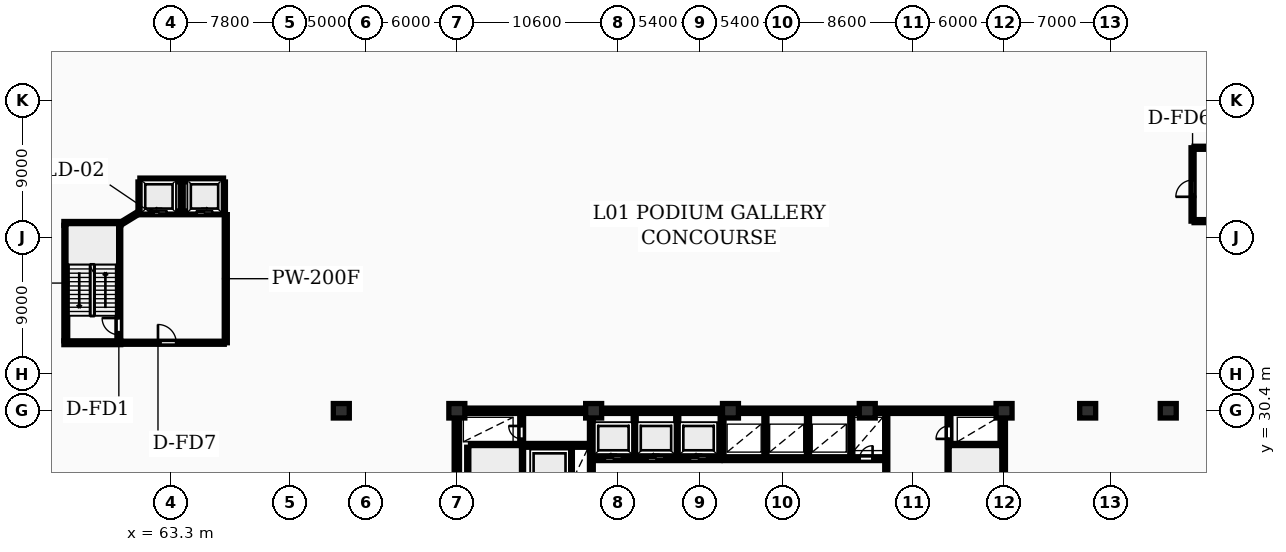
"""IFC4 building model, lengths in metres.
Left out: names, types, materials, properties, quantities, classifications, styles, units other than length and angle.
Written with IfcOpenShell. Run it as: python <this file> out.ifc"""

import sys

from ifc_helpers import new_model, si_unit, direction, frame, frame_2d, origin, origin_2d, place, context, subcontext, project, spatial, rectangle, extrude, element, fill, save


model = new_model("IFC4")
c1 = context("Model", 3, precision=1e-05, world=origin(), true_north=direction((0.0, 1.0)))
c2 = subcontext(c1, "Body", "Model", "MODEL_VIEW")
j1 = project(units=[si_unit("LENGTHUNIT", "METRE"), si_unit("PLANEANGLEUNIT", "RADIAN")], contexts=[c1])
p1 = place(None, origin())
s1 = spatial("IfcSite", under=j1, at=p1, CompositionType="ELEMENT")
p2 = place(p1, origin())
s2 = spatial("IfcBuilding", under=s1, at=p2, CompositionType="ELEMENT")
p3 = place(p2, frame((0.0, 0.0, 5.4)))
s3 = spatial("IfcBuildingStorey", under=s2, at=p3, CompositionType="ELEMENT", Elevation=5.4)
for number, where, z_axis, x_axis in (
    (1, (74.5, 30.4, 0.0), (0.0, 0.0, 1.0), (1.0, 0.0, 0.0)),
    (2, (82.1, 30.4, 0.0), (0.0, 0.0, 1.0), (1.0, 0.0, 0.0)),
    (3, (91.1, 30.4, 0.0), (0.0, 0.0, 1.0), (1.0, 0.0, 0.0)),
    (4, (100.1, 30.4, 0.0), (0.0, 0.0, 1.0), (1.0, 0.0, 0.0)),
    (5, (109.1, 30.4, 0.0), (0.0, 0.0, 1.0), (1.0, 0.0, 0.0)),
    (6, (118.1, 30.4, 0.0), (0.0, 0.0, 1.0), (1.0, 0.0, 0.0)),
    (7, (123.6, 30.4, 0.0), (0.0, 0.0, 1.0), (1.0, 0.0, 0.0)),
    (8, (128.9, 30.4, 0.0), (0.0, 0.0, 1.0), (1.0, 0.0, 0.0)),
):
    element("IfcColumn", number, at=place(p3, frame(where, z_axis=z_axis, x_axis=x_axis)), inside=s3, PredefinedType="COLUMN", context=c2, shape_type="SweptSolid", body=[
        extrude(rectangle(XDim=1.05, YDim=0.95, at=origin_2d()), origin(), (0.0, 0.0, 1.0), 4.6),
    ])
p4 = place(p3, frame((81.925, 30.4, 0.0), z_axis=(0.0, 0.0, 1.0), x_axis=(1.0, 0.0, 0.0)))
e9 = element("IfcWall", 9, at=p4, inside=s3, PredefinedType="SHEAR", context=c2, shape_type="SweptSolid", body=[
    extrude(rectangle(XDim=36.265, YDim=0.35, at=frame_2d((18.132, 0.0))), origin(), (0.0, 0.0, 1.0), 4.6),
])
for number, where, z_axis, x_axis in (
    (10, (82.1, 18.575, 0.0), (0.0, 0.0, 1.0), (0.0, 1.0, 0.0)),
    (11, (118.015, 18.575, 0.0), (0.0, 0.0, 1.0), (0.0, 1.0, 0.0)),
):
    element("IfcWall", number, at=place(p3, frame(where, z_axis=z_axis, x_axis=x_axis)), inside=s3, PredefinedType="SHEAR", context=c2, shape_type="SweptSolid", body=[
        extrude(rectangle(XDim=11.65, YDim=0.35, at=frame_2d((5.825, 0.0))), origin(), (0.0, 0.0, 1.0), 4.6),
    ])
p5 = place(p3, frame((82.875, 20.4, 0.0), z_axis=(0.0, 0.0, 1.0), x_axis=(0.0, 1.0, 0.0)))
e12 = element("IfcWall", 12, at=p5, inside=s3, PredefinedType="SHEAR", context=c2, shape_type="SweptSolid", body=[
    extrude(rectangle(XDim=7.6, YDim=0.25, at=frame_2d((3.8, 0.0))), origin(), (0.0, 0.0, 1.0), 4.6),
])
p6 = place(p3, frame((86.365, 18.6, 0.0), z_axis=(0.0, 0.0, 1.0), x_axis=(0.0, 1.0, 0.0)))
e13 = element("IfcWall", 13, at=p6, inside=s3, PredefinedType="SHEAR", context=c2, shape_type="SweptSolid", body=[
    extrude(rectangle(XDim=11.6, YDim=0.25, at=frame_2d((5.8, 0.0))), origin(), (0.0, 0.0, 1.0), 4.6),
])
p7 = place(p6, frame((0.45, 0.0, 0.0)))
e14 = element("IfcOpeningElement", 14, at=p7, cuts=e13, PredefinedType="OPENING", context=c2, shape_type="SweptSolid", body=[
    extrude(rectangle(XDim=0.85, YDim=2.05, at=frame_2d((0.425, 1.025))), frame((0.0, 0.135, 0.0), z_axis=(0.0, -1.0, 0.0), x_axis=(1.0, 0.0, 0.0)), (0.0, 0.0, 1.0), 0.27),
])
p8 = place(p6, frame((2.05, 0.0, 0.0)))
e15 = element("IfcOpeningElement", 15, at=p8, cuts=e13, PredefinedType="OPENING", context=c2, shape_type="SweptSolid", body=[
    extrude(rectangle(XDim=1.1, YDim=2.1, at=frame_2d((0.55, 1.05))), frame((0.0, 0.135, 0.0), z_axis=(0.0, -1.0, 0.0), x_axis=(1.0, 0.0, 0.0)), (0.0, 0.0, 1.0), 0.27),
])
p9 = place(p6, frame((9.95, 0.0, 0.0)))
e16 = element("IfcOpeningElement", 16, at=p9, cuts=e13, PredefinedType="OPENING", context=c2, shape_type="SweptSolid", body=[
    extrude(rectangle(XDim=0.85, YDim=2.05, at=frame_2d((0.425, 1.025))), frame((0.0, 0.135, 0.0), z_axis=(0.0, -1.0, 0.0), x_axis=(1.0, 0.0, 0.0)), (0.0, 0.0, 1.0), 0.27),
])
p10 = place(p3, frame((83.0, 28.125, 0.0), z_axis=(0.0, 0.0, 1.0), x_axis=(1.0, 0.0, 0.0)))
e17 = element("IfcWall", 17, at=p10, inside=s3, PredefinedType="SHEAR", context=c2, shape_type="SweptSolid", body=[
    extrude(rectangle(XDim=7.82, YDim=0.25, at=frame_2d((3.91, 0.0))), origin(), (0.0, 0.0, 1.0), 4.6),
])
p11 = place(p3, frame((89.6, 25.58, 0.0), z_axis=(0.0, 0.0, 1.0), x_axis=(0.0, 1.0, 0.0)))
e18 = element("IfcWall", 18, at=p11, inside=s3, PredefinedType="PARTITIONING", context=c2, shape_type="SweptSolid", body=[
    extrude(rectangle(XDim=2.42, YDim=0.2, at=frame_2d((1.21, 0.0))), origin(), (0.0, 0.0, 1.0), 4.3),
])
p12 = place(p3, frame((90.95, 18.6, 0.0), z_axis=(0.0, 0.0, 1.0), x_axis=(0.0, 1.0, 0.0)))
e19 = element("IfcWall", 19, at=p12, inside=s3, PredefinedType="SHEAR", context=c2, shape_type="SweptSolid", body=[
    extrude(rectangle(XDim=11.6, YDim=0.25, at=frame_2d((5.8, 0.0))), origin(), (0.0, 0.0, 1.0), 4.6),
])
p13 = place(p12, frame((4.6, 0.0, 0.0)))
e20 = element("IfcOpeningElement", 20, at=p13, cuts=e19, PredefinedType="OPENING", context=c2, shape_type="SweptSolid", body=[
    extrude(rectangle(XDim=1.1, YDim=2.1, at=frame_2d((0.55, 1.05))), frame((0.0, 0.135, 0.0), z_axis=(0.0, -1.0, 0.0), x_axis=(1.0, 0.0, 0.0)), (0.0, 0.0, 1.0), 0.27),
])
for number, where, z_axis, x_axis in (
    (21, (93.8, 27.38, 0.0), (0.0, 0.0, 1.0), (0.0, 1.0, 0.0)),
    (22, (96.6, 27.38, 0.0), (0.0, 0.0, 1.0), (0.0, 1.0, 0.0)),
):
    element("IfcWall", number, at=place(p3, frame(where, z_axis=z_axis, x_axis=x_axis)), inside=s3, PredefinedType="PARTITIONING", context=c2, shape_type="SweptSolid", body=[
        extrude(rectangle(XDim=2.82, YDim=0.2, at=frame_2d((1.41, 0.0))), origin(), (0.0, 0.0, 1.0), 4.3),
    ])
p14 = place(p3, frame((91.08, 27.25, 0.0), z_axis=(0.0, 0.0, 1.0), x_axis=(1.0, 0.0, 0.0)))
e23 = element("IfcWall", 23, at=p14, inside=s3, PredefinedType="SHEAR", context=c2, shape_type="SweptSolid", body=[
    extrude(rectangle(XDim=8.34, YDim=0.25, at=frame_2d((4.17, 0.0))), origin(), (0.0, 0.0, 1.0), 4.6),
])
p15 = place(p14, frame((0.76, 0.0, 0.0)))
e24 = element("IfcOpeningElement", 24, at=p15, cuts=e23, PredefinedType="OPENING", context=c2, shape_type="SweptSolid", body=[
    extrude(rectangle(XDim=1.12, YDim=2.12, at=frame_2d((0.56, 1.06))), frame((0.0, 0.135, 0.0), z_axis=(0.0, -1.0, 0.0), x_axis=(1.0, 0.0, 0.0)), (0.0, 0.0, 1.0), 0.27),
])
p16 = place(p14, frame((3.56, 0.0, 0.0)))
e25 = element("IfcOpeningElement", 25, at=p16, cuts=e23, PredefinedType="OPENING", context=c2, shape_type="SweptSolid", body=[
    extrude(rectangle(XDim=1.12, YDim=2.12, at=frame_2d((0.56, 1.06))), frame((0.0, 0.135, 0.0), z_axis=(0.0, -1.0, 0.0), x_axis=(1.0, 0.0, 0.0)), (0.0, 0.0, 1.0), 0.27),
])
p17 = place(p14, frame((6.36, 0.0, 0.0)))
e26 = element("IfcOpeningElement", 26, at=p17, cuts=e23, PredefinedType="OPENING", context=c2, shape_type="SweptSolid", body=[
    extrude(rectangle(XDim=1.12, YDim=2.12, at=frame_2d((0.56, 1.06))), frame((0.0, 0.135, 0.0), z_axis=(0.0, -1.0, 0.0), x_axis=(1.0, 0.0, 0.0)), (0.0, 0.0, 1.0), 0.27),
])
p18 = place(p3, frame((99.55, 27.25, 0.0), z_axis=(0.0, 0.0, 1.0), x_axis=(0.0, 1.0, 0.0)))
e27 = element("IfcWall", 27, at=p18, inside=s3, PredefinedType="SHEAR", context=c2, shape_type="SweptSolid", body=[
    extrude(rectangle(XDim=2.95, YDim=0.25, at=frame_2d((1.475, 0.0))), origin(), (0.0, 0.0, 1.0), 4.6),
])
for number, where, z_axis, x_axis in (
    (28, (102.4, 27.38, 0.0), (0.0, 0.0, 1.0), (0.0, 1.0, 0.0)),
    (29, (105.2, 27.38, 0.0), (0.0, 0.0, 1.0), (0.0, 1.0, 0.0)),
    (30, (108.05, 27.38, 0.0), (0.0, 0.0, 1.0), (0.0, 1.0, 0.0)),
):
    element("IfcWall", number, at=place(p3, frame(where, z_axis=z_axis, x_axis=x_axis)), inside=s3, PredefinedType="PARTITIONING", context=c2, shape_type="SweptSolid", body=[
        extrude(rectangle(XDim=2.82, YDim=0.2, at=frame_2d((1.41, 0.0))), origin(), (0.0, 0.0, 1.0), 4.3),
    ])
p19 = place(p3, frame((99.68, 27.25, 0.0), z_axis=(0.0, 0.0, 1.0), x_axis=(1.0, 0.0, 0.0)))
e31 = element("IfcWall", 31, at=p19, inside=s3, PredefinedType="SHEAR", context=c2, shape_type="SweptSolid", body=[
    extrude(rectangle(XDim=10.54, YDim=0.25, at=frame_2d((5.27, 0.0))), origin(), (0.0, 0.0, 1.0), 4.6),
])
p20 = place(p19, frame((8.92, 0.0, 0.0)))
e32 = element("IfcOpeningElement", 32, at=p20, cuts=e31, PredefinedType="OPENING", context=c2, shape_type="SweptSolid", body=[
    extrude(rectangle(XDim=0.85, YDim=2.05, at=frame_2d((0.425, 1.025))), frame((0.0, 0.135, 0.0), z_axis=(0.0, -1.0, 0.0), x_axis=(1.0, 0.0, 0.0)), (0.0, 0.0, 1.0), 0.27),
])
p21 = place(p3, frame((110.35, 18.6, 0.0), z_axis=(0.0, 0.0, 1.0), x_axis=(0.0, 1.0, 0.0)))
e33 = element("IfcWall", 33, at=p21, inside=s3, PredefinedType="PARTITIONING", context=c2, shape_type="SweptSolid", body=[
    extrude(rectangle(XDim=11.6, YDim=0.2, at=frame_2d((5.8, 0.0))), origin(), (0.0, 0.0, 1.0), 4.3),
])
p22 = place(p21, frame((5.2, 0.0, 0.0)))
e34 = element("IfcOpeningElement", 34, at=p22, cuts=e33, PredefinedType="OPENING", context=c2, shape_type="SweptSolid", body=[
    extrude(rectangle(XDim=1.1, YDim=2.15, at=frame_2d((0.55, 1.075))), frame((0.0, 0.11, 0.0), z_axis=(0.0, -1.0, 0.0), x_axis=(1.0, 0.0, 0.0)), (0.0, 0.0, 1.0), 0.22),
])
p23 = place(p3, frame((114.475, 18.6, 0.0), z_axis=(0.0, 0.0, 1.0), x_axis=(0.0, 1.0, 0.0)))
e35 = element("IfcWall", 35, at=p23, inside=s3, PredefinedType="SHEAR", context=c2, shape_type="SweptSolid", body=[
    extrude(rectangle(XDim=11.6, YDim=0.25, at=frame_2d((5.8, 0.0))), origin(), (0.0, 0.0, 1.0), 4.6),
])
p24 = place(p23, frame((0.45, 0.0, 0.0)))
e36 = element("IfcOpeningElement", 36, at=p24, cuts=e35, PredefinedType="OPENING", context=c2, shape_type="SweptSolid", body=[
    extrude(rectangle(XDim=0.85, YDim=2.05, at=frame_2d((0.425, 1.025))), frame((0.0, 0.135, 0.0), z_axis=(0.0, -1.0, 0.0), x_axis=(1.0, 0.0, 0.0)), (0.0, 0.0, 1.0), 0.27),
])
p25 = place(p23, frame((2.05, 0.0, 0.0)))
e37 = element("IfcOpeningElement", 37, at=p25, cuts=e35, PredefinedType="OPENING", context=c2, shape_type="SweptSolid", body=[
    extrude(rectangle(XDim=1.1, YDim=2.1, at=frame_2d((0.55, 1.05))), frame((0.0, 0.135, 0.0), z_axis=(0.0, -1.0, 0.0), x_axis=(1.0, 0.0, 0.0)), (0.0, 0.0, 1.0), 0.27),
])
p26 = place(p23, frame((9.95, 0.0, 0.0)))
e38 = element("IfcOpeningElement", 38, at=p26, cuts=e35, PredefinedType="OPENING", context=c2, shape_type="SweptSolid", body=[
    extrude(rectangle(XDim=0.85, YDim=2.05, at=frame_2d((0.425, 1.025))), frame((0.0, 0.135, 0.0), z_axis=(0.0, -1.0, 0.0), x_axis=(1.0, 0.0, 0.0)), (0.0, 0.0, 1.0), 0.27),
])
p27 = place(p3, frame((114.6, 28.125, 0.0), z_axis=(0.0, 0.0, 1.0), x_axis=(1.0, 0.0, 0.0)))
e39 = element("IfcWall", 39, at=p27, inside=s3, PredefinedType="SHEAR", context=c2, shape_type="SweptSolid", body=[
    extrude(rectangle(XDim=3.24, YDim=0.25, at=frame_2d((1.62, 0.0))), origin(), (0.0, 0.0, 1.0), 4.6),
])
p28 = place(p3, frame((56.375, 35.0, 0.0), z_axis=(0.0, 0.0, 1.0), x_axis=(0.0, 1.0, 0.0)))
e40 = element("IfcWall", 40, at=p28, inside=s3, PredefinedType="SHEAR", context=c2, shape_type="SweptSolid", body=[
    extrude(rectangle(XDim=7.6, YDim=0.25, at=frame_2d((3.8, 0.0))), origin(), (0.0, 0.0, 1.0), 4.6),
])
for number, where, z_axis, x_axis in (
    (41, (56.25, 42.725, 0.0), (0.0, 0.0, 1.0), (1.0, 0.0, 0.0)),
    (42, (56.25, 34.875, 0.0), (0.0, 0.0, 1.0), (1.0, 0.0, 0.0)),
):
    element("IfcWall", number, at=place(p3, frame(where, z_axis=z_axis, x_axis=x_axis)), inside=s3, PredefinedType="SHEAR", context=c2, shape_type="SweptSolid", body=[
        extrude(rectangle(XDim=3.74, YDim=0.25, at=frame_2d((1.87, 0.0))), origin(), (0.0, 0.0, 1.0), 4.6),
    ])
p29 = place(p3, frame((59.865, 35.0, 0.0), z_axis=(0.0, 0.0, 1.0), x_axis=(0.0, 1.0, 0.0)))
e43 = element("IfcWall", 43, at=p29, inside=s3, PredefinedType="SHEAR", context=c2, shape_type="SweptSolid", body=[
    extrude(rectangle(XDim=7.6, YDim=0.25, at=frame_2d((3.8, 0.0))), origin(), (0.0, 0.0, 1.0), 4.6),
])
p30 = place(p29, frame((0.4, 0.0, 0.0)))
e44 = element("IfcOpeningElement", 44, at=p30, cuts=e43, PredefinedType="OPENING", context=c2, shape_type="SweptSolid", body=[
    extrude(rectangle(XDim=1.1, YDim=2.1, at=frame_2d((0.55, 1.05))), frame((0.0, 0.135, 0.0), z_axis=(0.0, -1.0, 0.0), x_axis=(1.0, 0.0, 0.0)), (0.0, 0.0, 1.0), 0.27),
])
p31 = place(p3, frame((61.25, 43.42, 0.0), z_axis=(0.0, 0.0, 1.0), x_axis=(1.0, 0.0, 0.0)))
e45 = element("IfcWall", 45, at=p31, inside=s3, PredefinedType="SHEAR", context=c2, shape_type="SweptSolid", body=[
    extrude(rectangle(XDim=5.5, YDim=0.25, at=frame_2d((2.75, 0.0))), origin(), (0.0, 0.0, 1.0), 4.6),
])
p32 = place(p31, frame((0.74, 0.0, 0.0)))
e46 = element("IfcOpeningElement", 46, at=p32, cuts=e45, PredefinedType="OPENING", context=c2, shape_type="SweptSolid", body=[
    extrude(rectangle(XDim=1.02, YDim=2.12, at=frame_2d((0.51, 1.06))), frame((0.0, 0.135, 0.0), z_axis=(0.0, -1.0, 0.0), x_axis=(1.0, 0.0, 0.0)), (0.0, 0.0, 1.0), 0.27),
])
p33 = place(p31, frame((3.74, 0.0, 0.0)))
e47 = element("IfcOpeningElement", 47, at=p33, cuts=e45, PredefinedType="OPENING", context=c2, shape_type="SweptSolid", body=[
    extrude(rectangle(XDim=1.02, YDim=2.12, at=frame_2d((0.51, 1.06))), frame((0.0, 0.135, 0.0), z_axis=(0.0, -1.0, 0.0), x_axis=(1.0, 0.0, 0.0)), (0.0, 0.0, 1.0), 0.27),
])
p34 = place(p3, frame((61.25, 45.58, 0.0), z_axis=(0.0, 0.0, 1.0), x_axis=(1.0, 0.0, 0.0)))
e48 = element("IfcWall", 48, at=p34, inside=s3, PredefinedType="SHEAR", context=c2, shape_type="SweptSolid", body=[
    extrude(rectangle(XDim=5.5, YDim=0.25, at=frame_2d((2.75, 0.0))), origin(), (0.0, 0.0, 1.0), 4.6),
])
for number, where, z_axis, x_axis in (
    (49, (61.25, 43.55, 0.0), (0.0, 0.0, 1.0), (0.0, 1.0, 0.0)),
    (50, (66.75, 43.55, 0.0), (0.0, 0.0, 1.0), (0.0, 1.0, 0.0)),
):
    element("IfcWall", number, at=place(p3, frame(where, z_axis=z_axis, x_axis=x_axis)), inside=s3, PredefinedType="SHEAR", context=c2, shape_type="SweptSolid", body=[
        extrude(rectangle(XDim=1.9, YDim=0.25, at=frame_2d((0.95, 0.0))), origin(), (0.0, 0.0, 1.0), 4.6),
    ])
p35 = place(p3, frame((64.0, 43.55, 0.0), z_axis=(0.0, 0.0, 1.0), x_axis=(0.0, 1.0, 0.0)))
e51 = element("IfcWall", 51, at=p35, inside=s3, PredefinedType="PARTITIONING", context=c2, shape_type="SweptSolid", body=[
    extrude(rectangle(XDim=1.9, YDim=0.2, at=frame_2d((0.95, 0.0))), origin(), (0.0, 0.0, 1.0), 4.3),
])
p36 = place(p3, frame((59.84, 34.875, 0.0), z_axis=(0.0, 0.0, 1.0), x_axis=(1.0, 0.0, 0.0)))
e52 = element("IfcWall", 52, at=p36, inside=s3, PredefinedType="PARTITIONING", context=c2, shape_type="SweptSolid", body=[
    extrude(rectangle(XDim=6.96, YDim=0.2, at=frame_2d((3.48, 0.0))), origin(), (0.0, 0.0, 1.0), 4.3),
])
p37 = place(p36, frame((2.6, 0.0, 0.0)))
e53 = element("IfcOpeningElement", 53, at=p37, cuts=e52, PredefinedType="OPENING", context=c2, shape_type="SweptSolid", body=[
    extrude(rectangle(XDim=1.2, YDim=2.18, at=frame_2d((0.6, 1.09))), frame((0.0, 0.11, 0.0), z_axis=(0.0, -1.0, 0.0), x_axis=(1.0, 0.0, 0.0)), (0.0, 0.0, 1.0), 0.22),
])
p38 = place(p3, frame((66.9, 34.875, 0.0), z_axis=(0.0, 0.0, 1.0), x_axis=(0.0, 1.0, 0.0)))
e54 = element("IfcWall", 54, at=p38, inside=s3, PredefinedType="PARTITIONING", context=c2, shape_type="SweptSolid", body=[
    extrude(rectangle(XDim=8.425, YDim=0.2, at=frame_2d((4.212, 0.0))), origin(), (0.0, 0.0, 1.0), 4.3),
])
p39 = place(p3, frame((60.02, 42.725, 0.0), z_axis=(0.0, 0.0, 1.0), x_axis=(0.851822584555, 0.523830396638, 0.0)))
e55 = element("IfcWall", 55, at=p39, inside=s3, PredefinedType="PARTITIONING", context=c2, shape_type="SweptSolid", body=[
    extrude(rectangle(XDim=1.326, YDim=0.2, at=frame_2d((0.663, 0.0))), origin(), (0.0, 0.0, 1.0), 4.3),
])
p40 = place(p3, frame((130.5, 42.875, 0.0), z_axis=(0.0, 0.0, 1.0), x_axis=(0.0, 1.0, 0.0)))
e56 = element("IfcWall", 56, at=p40, inside=s3, PredefinedType="PARTITIONING", context=c2, shape_type="SweptSolid", body=[
    extrude(rectangle(XDim=4.825, YDim=0.2, at=frame_2d((2.413, 0.0))), origin(), (0.0, 0.0, 1.0), 4.3),
])
p41 = place(p40, frame((1.6, 0.0, 0.0)))
e57 = element("IfcOpeningElement", 57, at=p41, cuts=e56, PredefinedType="OPENING", context=c2, shape_type="SweptSolid", body=[
    extrude(rectangle(XDim=1.1, YDim=2.15, at=frame_2d((0.55, 1.075))), frame((0.0, 0.11, 0.0), z_axis=(0.0, -1.0, 0.0), x_axis=(1.0, 0.0, 0.0)), (0.0, 0.0, 1.0), 0.22),
])
for number, where, z_axis, x_axis in (
    (58, (130.6, 42.875, 0.0), (0.0, 0.0, 1.0), (1.0, 0.0, 0.0)),
    (59, (130.6, 47.7, 0.0), (0.0, 0.0, 1.0), (1.0, 0.0, 0.0)),
):
    element("IfcWall", number, at=place(p3, frame(where, z_axis=z_axis, x_axis=x_axis)), inside=s3, PredefinedType="PARTITIONING", context=c2, shape_type="SweptSolid", body=[
        extrude(rectangle(XDim=3.65, YDim=0.2, at=frame_2d((1.825, 0.0))), origin(), (0.0, 0.0, 1.0), 4.3),
    ])
p42 = place(p9, origin())
e60 = element("IfcDoor", 60, at=p42, inside=s3, OperationType="SINGLE_SWING_RIGHT", PredefinedType="DOOR", context=c2, shape_type="SweptSolid", body=[
    extrude(rectangle(XDim=0.85, YDim=2.05, at=frame_2d((0.425, 1.025))), frame((0.0, 0.025, 0.0), z_axis=(0.0, -1.0, 0.0), x_axis=(1.0, 0.0, 0.0)), (0.0, 0.0, 1.0), 0.05),
])
fill(e16, e60)
p43 = place(p15, origin())
e61 = element("IfcDoor", 61, at=p43, inside=s3, OperationType="SLIDING_TO_LEFT", PredefinedType="DOOR", context=c2, shape_type="SweptSolid", body=[
    extrude(rectangle(XDim=1.12, YDim=2.12, at=frame_2d((0.56, 1.06))), frame((0.0, 0.025, 0.0), z_axis=(0.0, -1.0, 0.0), x_axis=(1.0, 0.0, 0.0)), (0.0, 0.0, 1.0), 0.05),
])
fill(e24, e61)
p44 = place(p16, origin())
e62 = element("IfcDoor", 62, at=p44, inside=s3, OperationType="SLIDING_TO_LEFT", PredefinedType="DOOR", context=c2, shape_type="SweptSolid", body=[
    extrude(rectangle(XDim=1.12, YDim=2.12, at=frame_2d((0.56, 1.06))), frame((0.0, 0.025, 0.0), z_axis=(0.0, -1.0, 0.0), x_axis=(1.0, 0.0, 0.0)), (0.0, 0.0, 1.0), 0.05),
])
fill(e25, e62)
p45 = place(p17, origin())
e63 = element("IfcDoor", 63, at=p45, inside=s3, OperationType="SLIDING_TO_LEFT", PredefinedType="DOOR", context=c2, shape_type="SweptSolid", body=[
    extrude(rectangle(XDim=1.12, YDim=2.12, at=frame_2d((0.56, 1.06))), frame((0.0, 0.025, 0.0), z_axis=(0.0, -1.0, 0.0), x_axis=(1.0, 0.0, 0.0)), (0.0, 0.0, 1.0), 0.05),
])
fill(e26, e63)
p46 = place(p20, origin())
e64 = element("IfcDoor", 64, at=p46, inside=s3, OperationType="SINGLE_SWING_RIGHT", PredefinedType="DOOR", context=c2, shape_type="SweptSolid", body=[
    extrude(rectangle(XDim=0.85, YDim=2.05, at=frame_2d((0.425, 1.025))), frame((0.0, 0.025, 0.0), z_axis=(0.0, -1.0, 0.0), x_axis=(1.0, 0.0, 0.0)), (0.0, 0.0, 1.0), 0.05),
])
fill(e32, e64)
p47 = place(p26, origin())
e65 = element("IfcDoor", 65, at=p47, inside=s3, OperationType="SINGLE_SWING_LEFT", PredefinedType="DOOR", context=c2, shape_type="SweptSolid", body=[
    extrude(rectangle(XDim=0.85, YDim=2.05, at=frame_2d((0.425, 1.025))), frame((0.0, 0.025, 0.0), z_axis=(0.0, -1.0, 0.0), x_axis=(1.0, 0.0, 0.0)), (0.0, 0.0, 1.0), 0.05),
])
fill(e38, e65)
p48 = place(p30, origin())
e66 = element("IfcDoor", 66, at=p48, inside=s3, OperationType="SINGLE_SWING_RIGHT", PredefinedType="DOOR", context=c2, shape_type="SweptSolid", body=[
    extrude(rectangle(XDim=1.1, YDim=2.1, at=frame_2d((0.55, 1.05))), frame((0.0, 0.025, 0.0), z_axis=(0.0, -1.0, 0.0), x_axis=(1.0, 0.0, 0.0)), (0.0, 0.0, 1.0), 0.05),
])
fill(e44, e66)
p49 = place(p32, origin())
e67 = element("IfcDoor", 67, at=p49, inside=s3, OperationType="SLIDING_TO_LEFT", PredefinedType="DOOR", context=c2, shape_type="SweptSolid", body=[
    extrude(rectangle(XDim=1.02, YDim=2.12, at=frame_2d((0.51, 1.06))), frame((0.0, 0.025, 0.0), z_axis=(0.0, -1.0, 0.0), x_axis=(1.0, 0.0, 0.0)), (0.0, 0.0, 1.0), 0.05),
])
fill(e46, e67)
p50 = place(p33, origin())
e68 = element("IfcDoor", 68, at=p50, inside=s3, OperationType="SLIDING_TO_RIGHT", PredefinedType="DOOR", context=c2, shape_type="SweptSolid", body=[
    extrude(rectangle(XDim=1.02, YDim=2.12, at=frame_2d((0.51, 1.06))), frame((0.0, 0.025, 0.0), z_axis=(0.0, -1.0, 0.0), x_axis=(1.0, 0.0, 0.0)), (0.0, 0.0, 1.0), 0.05),
])
fill(e47, e68)
p51 = place(p37, origin())
e69 = element("IfcDoor", 69, at=p51, inside=s3, OperationType="SINGLE_SWING_LEFT", PredefinedType="DOOR", context=c2, shape_type="SweptSolid", body=[
    extrude(rectangle(XDim=1.2, YDim=2.18, at=frame_2d((0.6, 1.09))), frame((0.0, 0.025, 0.0), z_axis=(0.0, -1.0, 0.0), x_axis=(1.0, 0.0, 0.0)), (0.0, 0.0, 1.0), 0.05),
])
fill(e53, e69)
p52 = place(p41, origin())
e70 = element("IfcDoor", 70, at=p52, inside=s3, OperationType="SINGLE_SWING_LEFT", PredefinedType="DOOR", context=c2, shape_type="SweptSolid", body=[
    extrude(rectangle(XDim=1.1, YDim=2.15, at=frame_2d((0.55, 1.075))), frame((0.0, 0.025, 0.0), z_axis=(0.0, -1.0, 0.0), x_axis=(1.0, 0.0, 0.0)), (0.0, 0.0, 1.0), 0.05),
])
fill(e57, e70)
save(model, sys.argv[1])
